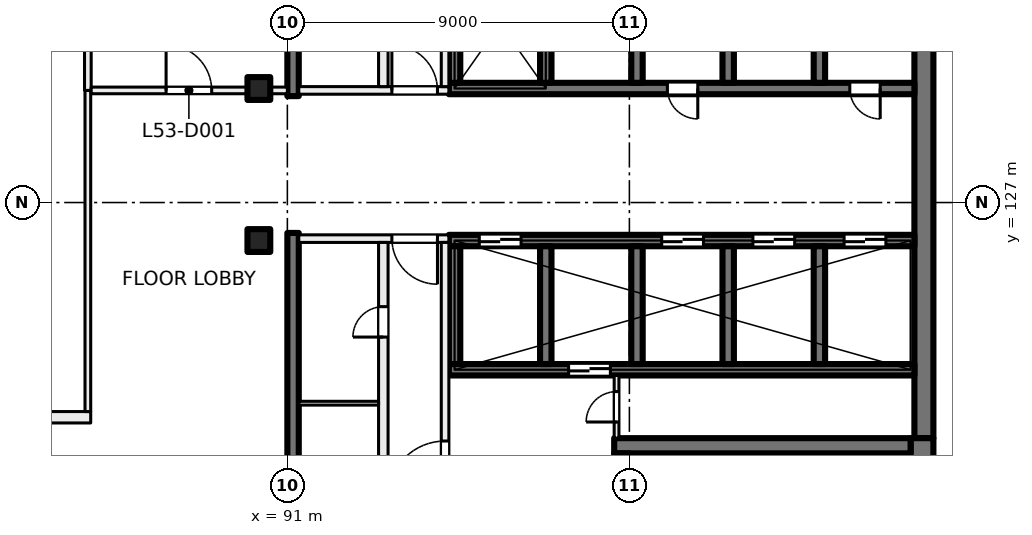
"""IFC4 building model, lengths in metres.
Left out: names, types, materials, properties, quantities, classifications, styles, units other than length and angle.
Written with IfcOpenShell. Run it as: python <this file> out.ifc"""

import sys

from ifc_helpers import new_model, si_unit, direction, frame, frame_2d, origin, origin_2d, place, context, subcontext, project, spatial, rectangle, extrude, element, fill, save


model = new_model("IFC4")
c1 = context("Model", 3, precision=1e-05, world=origin(), true_north=direction((0.0, 1.0)))
c2 = subcontext(c1, "Body", "Model", "MODEL_VIEW")
j1 = project(units=[si_unit("LENGTHUNIT", "METRE"), si_unit("PLANEANGLEUNIT", "RADIAN")], contexts=[c1])
p1 = place(None, origin())
s1 = spatial("IfcSite", under=j1, at=p1, CompositionType="ELEMENT")
p2 = place(p1, origin())
s2 = spatial("IfcBuilding", under=s1, at=p2, CompositionType="ELEMENT")
p3 = place(p2, frame((0.0, 0.0, 224.0)))
s3 = spatial("IfcBuildingStorey", under=s2, at=p3, CompositionType="ELEMENT", Elevation=224.0)
for number, where, z_axis, x_axis in (
    (1, (90.25, 130.0, 0.0), (0.0, 0.0, 1.0), (1.0, 0.0, 0.0)),
    (2, (90.25, 126.0, 0.0), (0.0, 0.0, 1.0), (1.0, 0.0, 0.0)),
):
    element("IfcColumn", number, at=place(p3, frame(where, z_axis=z_axis, x_axis=x_axis)), inside=s3, PredefinedType="COLUMN", context=c2, shape_type="SweptSolid", body=[
        extrude(rectangle(XDim=0.6, YDim=0.6, at=origin_2d()), origin(), (0.0, 0.0, 1.0), 4.0),
    ])
p4 = place(p3, frame((107.75, 135.2, 0.0), z_axis=(0.0, 0.0, 1.0), x_axis=(0.0, -1.0, 0.0)))
e3 = element("IfcWall", 3, at=p4, inside=s3, PredefinedType="SHEAR", context=c2, shape_type="SweptSolid", body=[
    extrude(rectangle(XDim=14.4, YDim=0.5, at=frame_2d((7.2, 0.0))), origin(), (0.0, 0.0, 1.0), 4.0),
])
p5 = place(p3, frame((107.7, 120.8, 0.0), z_axis=(0.0, 0.0, 1.0), x_axis=(0.0, -1.0, 0.0)))
e4 = element("IfcWall", 4, at=p5, inside=s3, PredefinedType="SHEAR", context=c2, shape_type="SweptSolid", body=[
    extrude(rectangle(XDim=3.8, YDim=0.6, at=frame_2d((1.9, 0.0))), origin(), (0.0, 0.0, 1.0), 4.0),
])
p6 = place(p3, frame((107.4, 120.6, 0.0), z_axis=(0.0, 0.0, 1.0), x_axis=(-1.0, 0.0, 0.0)))
e5 = element("IfcWall", 5, at=p6, inside=s3, PredefinedType="SHEAR", context=c2, shape_type="SweptSolid", body=[
    extrude(rectangle(XDim=7.8, YDim=0.4, at=frame_2d((3.9, 0.0))), origin(), (0.0, 0.0, 1.0), 4.0),
])
p7 = place(p3, frame((99.8, 120.4, 0.0), z_axis=(0.0, 0.0, 1.0), x_axis=(0.0, -1.0, 0.0)))
e6 = element("IfcWall", 6, at=p7, inside=s3, PredefinedType="SHEAR", context=c2, shape_type="SweptSolid", body=[
    extrude(rectangle(XDim=2.8, YDim=0.4, at=frame_2d((1.4, 0.0))), origin(), (0.0, 0.0, 1.0), 4.0),
])
p8 = place(p7, frame((0.95, 0.0, 0.0)))
e7 = element("IfcOpeningElement", 7, at=p8, cuts=e6, PredefinedType="OPENING", context=c2, shape_type="SweptSolid", body=[
    extrude(rectangle(XDim=1.0, YDim=2.1, at=frame_2d((0.5, 1.05))), frame((0.0, 0.21, 0.0), z_axis=(0.0, -1.0, 0.0), x_axis=(1.0, 0.0, 0.0)), (0.0, 0.0, 1.0), 0.42),
])
p9 = place(p3, frame((107.5, 130.0, 0.0), z_axis=(0.0, 0.0, 1.0), x_axis=(-1.0, 0.0, 0.0)))
e8 = element("IfcWall", 8, at=p9, inside=s3, PredefinedType="SHEAR", context=c2, shape_type="SweptSolid", body=[
    extrude(rectangle(XDim=12.25, YDim=0.3, at=frame_2d((6.125, 0.0))), origin(), (0.0, 0.0, 1.0), 4.0),
])
p10 = place(p9, frame((0.9, 0.0, 0.0)))
e9 = element("IfcOpeningElement", 9, at=p10, cuts=e8, PredefinedType="OPENING", context=c2, shape_type="SweptSolid", body=[
    extrude(rectangle(XDim=0.8, YDim=2.1, at=frame_2d((0.4, 1.05))), frame((0.0, 0.16, 0.0), z_axis=(0.0, -1.0, 0.0), x_axis=(1.0, 0.0, 0.0)), (0.0, 0.0, 1.0), 0.32),
])
p11 = place(p9, frame((5.7, 0.0, 0.0)))
e10 = element("IfcOpeningElement", 10, at=p11, cuts=e8, PredefinedType="OPENING", context=c2, shape_type="SweptSolid", body=[
    extrude(rectangle(XDim=0.8, YDim=2.1, at=frame_2d((0.4, 1.05))), frame((0.0, 0.16, 0.0), z_axis=(0.0, -1.0, 0.0), x_axis=(1.0, 0.0, 0.0)), (0.0, 0.0, 1.0), 0.32),
])
for number, where, z_axis, x_axis in (
    (11, (105.0, 133.25, 0.0), (0.0, 0.0, 1.0), (0.0, -1.0, 0.0)),
    (12, (102.6, 133.25, 0.0), (0.0, 0.0, 1.0), (0.0, -1.0, 0.0)),
    (13, (100.2, 133.25, 0.0), (0.0, 0.0, 1.0), (0.0, -1.0, 0.0)),
    (14, (97.8, 133.25, 0.0), (0.0, 0.0, 1.0), (0.0, -1.0, 0.0)),
    (15, (95.4, 133.25, 0.0), (0.0, 0.0, 1.0), (0.0, -1.0, 0.0)),
):
    element("IfcWall", number, at=place(p3, frame(where, z_axis=z_axis, x_axis=x_axis)), inside=s3, PredefinedType="SHEAR", context=c2, shape_type="SweptSolid", body=[
        extrude(rectangle(XDim=3.1, YDim=0.3, at=frame_2d((1.55, 0.0))), origin(), (0.0, 0.0, 1.0), 4.0),
    ])
p12 = place(p3, frame((107.5, 126.0, 0.0), z_axis=(0.0, 0.0, 1.0), x_axis=(-1.0, 0.0, 0.0)))
e16 = element("IfcWall", 16, at=p12, inside=s3, PredefinedType="SHEAR", context=c2, shape_type="SweptSolid", body=[
    extrude(rectangle(XDim=12.25, YDim=0.3, at=frame_2d((6.125, 0.0))), origin(), (0.0, 0.0, 1.0), 4.0),
])
p13 = place(p12, frame((0.75, 0.0, 0.0)))
e17 = element("IfcOpeningElement", 17, at=p13, cuts=e16, PredefinedType="OPENING", context=c2, shape_type="SweptSolid", body=[
    extrude(rectangle(XDim=1.1, YDim=2.1, at=frame_2d((0.55, 1.05))), frame((0.0, 0.16, 0.0), z_axis=(0.0, -1.0, 0.0), x_axis=(1.0, 0.0, 0.0)), (0.0, 0.0, 1.0), 0.32),
])
p14 = place(p12, frame((3.15, 0.0, 0.0)))
e18 = element("IfcOpeningElement", 18, at=p14, cuts=e16, PredefinedType="OPENING", context=c2, shape_type="SweptSolid", body=[
    extrude(rectangle(XDim=1.1, YDim=2.1, at=frame_2d((0.55, 1.05))), frame((0.0, 0.16, 0.0), z_axis=(0.0, -1.0, 0.0), x_axis=(1.0, 0.0, 0.0)), (0.0, 0.0, 1.0), 0.32),
])
p15 = place(p12, frame((5.55, 0.0, 0.0)))
e19 = element("IfcOpeningElement", 19, at=p15, cuts=e16, PredefinedType="OPENING", context=c2, shape_type="SweptSolid", body=[
    extrude(rectangle(XDim=1.1, YDim=2.1, at=frame_2d((0.55, 1.05))), frame((0.0, 0.16, 0.0), z_axis=(0.0, -1.0, 0.0), x_axis=(1.0, 0.0, 0.0)), (0.0, 0.0, 1.0), 0.32),
])
p16 = place(p12, frame((10.35, 0.0, 0.0)))
e20 = element("IfcOpeningElement", 20, at=p16, cuts=e16, PredefinedType="OPENING", context=c2, shape_type="SweptSolid", body=[
    extrude(rectangle(XDim=1.1, YDim=2.1, at=frame_2d((0.55, 1.05))), frame((0.0, 0.16, 0.0), z_axis=(0.0, -1.0, 0.0), x_axis=(1.0, 0.0, 0.0)), (0.0, 0.0, 1.0), 0.32),
])
p17 = place(p3, frame((107.5, 122.6, 0.0), z_axis=(0.0, 0.0, 1.0), x_axis=(-1.0, 0.0, 0.0)))
e21 = element("IfcWall", 21, at=p17, inside=s3, PredefinedType="SHEAR", context=c2, shape_type="SweptSolid", body=[
    extrude(rectangle(XDim=12.25, YDim=0.3, at=frame_2d((6.125, 0.0))), origin(), (0.0, 0.0, 1.0), 4.0),
])
p18 = place(p17, frame((8.0, 0.0, 0.0)))
e22 = element("IfcOpeningElement", 22, at=p18, cuts=e21, PredefinedType="OPENING", context=c2, shape_type="SweptSolid", body=[
    extrude(rectangle(XDim=1.1, YDim=2.1, at=frame_2d((0.55, 1.05))), frame((0.0, 0.16, 0.0), z_axis=(0.0, -1.0, 0.0), x_axis=(1.0, 0.0, 0.0)), (0.0, 0.0, 1.0), 0.32),
])
for number, where, z_axis, x_axis in (
    (23, (105.0, 125.85, 0.0), (0.0, 0.0, 1.0), (0.0, -1.0, 0.0)),
    (24, (102.6, 125.85, 0.0), (0.0, 0.0, 1.0), (0.0, -1.0, 0.0)),
    (25, (100.2, 125.85, 0.0), (0.0, 0.0, 1.0), (0.0, -1.0, 0.0)),
    (26, (97.8, 125.85, 0.0), (0.0, 0.0, 1.0), (0.0, -1.0, 0.0)),
    (27, (95.4, 125.85, 0.0), (0.0, 0.0, 1.0), (0.0, -1.0, 0.0)),
):
    element("IfcWall", number, at=place(p3, frame(where, z_axis=z_axis, x_axis=x_axis)), inside=s3, PredefinedType="SHEAR", context=c2, shape_type="SweptSolid", body=[
        extrude(rectangle(XDim=3.1, YDim=0.3, at=frame_2d((1.55, 0.0))), origin(), (0.0, 0.0, 1.0), 4.0),
    ])
for number, where, z_axis, x_axis in (
    (28, (91.15, 138.5, 0.0), (0.0, 0.0, 1.0), (0.0, -1.0, 0.0)),
    (29, (91.15, 126.2, 0.0), (0.0, 0.0, 1.0), (0.0, -1.0, 0.0)),
):
    element("IfcWall", number, at=place(p3, frame(where, z_axis=z_axis, x_axis=x_axis)), inside=s3, PredefinedType="SHEAR", context=c2, shape_type="SweptSolid", body=[
        extrude(rectangle(XDim=8.7, YDim=0.3, at=frame_2d((4.35, 0.0))), origin(), (0.0, 0.0, 1.0), 4.0),
    ])
p19 = place(p3, frame((95.25, 126.05, 0.0), z_axis=(0.0, 0.0, 1.0), x_axis=(-1.0, 0.0, 0.0)))
e30 = element("IfcWall", 30, at=p19, inside=s3, PredefinedType="PARTITIONING", context=c2, shape_type="SweptSolid", body=[
    extrude(rectangle(XDim=3.95, YDim=0.2, at=frame_2d((1.975, 0.0))), origin(), (0.0, 0.0, 1.0), 3.625),
])
p20 = place(p19, frame((0.3, 0.0, 0.0)))
e31 = element("IfcOpeningElement", 31, at=p20, cuts=e30, PredefinedType="OPENING", context=c2, shape_type="SweptSolid", body=[
    extrude(rectangle(XDim=1.2, YDim=2.1, at=frame_2d((0.6, 1.05))), frame((0.0, 0.11, 0.0), z_axis=(0.0, -1.0, 0.0), x_axis=(1.0, 0.0, 0.0)), (0.0, 0.0, 1.0), 0.22),
])
p21 = place(p3, frame((95.15, 117.5, 0.0), z_axis=(0.0, 0.0, 1.0), x_axis=(0.0, 1.0, 0.0)))
e32 = element("IfcWall", 32, at=p21, inside=s3, PredefinedType="PARTITIONING", context=c2, shape_type="SweptSolid", body=[
    extrude(rectangle(XDim=8.45, YDim=0.2, at=frame_2d((4.225, 0.0))), origin(), (0.0, 0.0, 1.0), 3.625),
])
p22 = place(p21, frame((1.725, 0.0, 0.0)))
e33 = element("IfcOpeningElement", 33, at=p22, cuts=e32, PredefinedType="OPENING", context=c2, shape_type="SweptSolid", body=[
    extrude(rectangle(XDim=1.5, YDim=2.1, at=frame_2d((0.75, 1.05))), frame((0.0, 0.11, 0.0), z_axis=(0.0, -1.0, 0.0), x_axis=(1.0, 0.0, 0.0)), (0.0, 0.0, 1.0), 0.22),
])
p23 = place(p3, frame((93.525, 117.5, 0.0), z_axis=(0.0, 0.0, 1.0), x_axis=(0.0, 1.0, 0.0)))
e34 = element("IfcWall", 34, at=p23, inside=s3, PredefinedType="PARTITIONING", context=c2, shape_type="SweptSolid", body=[
    extrude(rectangle(XDim=8.45, YDim=0.25, at=frame_2d((4.225, 0.0))), origin(), (0.0, 0.0, 1.0), 3.625),
])
p24 = place(p23, frame((5.96, 0.0, 0.0)))
e35 = element("IfcOpeningElement", 35, at=p24, cuts=e34, PredefinedType="OPENING", context=c2, shape_type="SweptSolid", body=[
    extrude(rectangle(XDim=0.8, YDim=2.1, at=frame_2d((0.4, 1.05))), frame((0.0, 0.135, 0.0), z_axis=(0.0, -1.0, 0.0), x_axis=(1.0, 0.0, 0.0)), (0.0, 0.0, 1.0), 0.27),
])
p25 = place(p23, frame((1.685, 0.0, 0.0)))
e36 = element("IfcOpeningElement", 36, at=p25, cuts=e34, PredefinedType="OPENING", context=c2, shape_type="SweptSolid", body=[
    extrude(rectangle(XDim=0.8, YDim=2.1, at=frame_2d((0.4, 1.05))), frame((0.0, 0.135, 0.0), z_axis=(0.0, -1.0, 0.0), x_axis=(1.0, 0.0, 0.0)), (0.0, 0.0, 1.0), 0.27),
])
p26 = place(p3, frame((99.663, 120.8, 0.0), z_axis=(0.0, 0.0, 1.0), x_axis=(0.0, 1.0, 0.0)))
e37 = element("IfcWall", 37, at=p26, inside=s3, PredefinedType="PARTITIONING", context=c2, shape_type="SweptSolid", body=[
    extrude(rectangle(XDim=1.65, YDim=0.125, at=frame_2d((0.825, 0.0))), origin(), (0.0, 0.0, 1.0), 3.625),
])
p27 = place(p26, frame((0.425, 0.0, 0.0)))
e38 = element("IfcOpeningElement", 38, at=p27, cuts=e37, PredefinedType="OPENING", context=c2, shape_type="SweptSolid", body=[
    extrude(rectangle(XDim=0.8, YDim=2.1, at=frame_2d((0.4, 1.05))), frame((0.0, 0.073, 0.0), z_axis=(0.0, -1.0, 0.0), x_axis=(1.0, 0.0, 0.0)), (0.0, 0.0, 1.0), 0.145),
])
p28 = place(p3, frame((93.4, 121.72, 0.0), z_axis=(0.0, 0.0, 1.0), x_axis=(-1.0, 0.0, 0.0)))
e39 = element("IfcWall", 39, at=p28, inside=s3, PredefinedType="PARTITIONING", context=c2, shape_type="SweptSolid", body=[
    extrude(rectangle(XDim=2.1, YDim=0.1, at=frame_2d((1.05, 0.0))), origin(), (0.0, 0.0, 1.0), 3.625),
])
p29 = place(p3, frame((91.3, 129.95, 0.0), z_axis=(0.0, 0.0, 1.0), x_axis=(1.0, 0.0, 0.0)))
e40 = element("IfcWall", 40, at=p29, inside=s3, PredefinedType="PARTITIONING", context=c2, shape_type="SweptSolid", body=[
    extrude(rectangle(XDim=3.95, YDim=0.2, at=frame_2d((1.975, 0.0))), origin(), (0.0, 0.0, 1.0), 3.625),
])
p30 = place(p29, frame((2.45, 0.0, 0.0)))
e41 = element("IfcOpeningElement", 41, at=p30, cuts=e40, PredefinedType="OPENING", context=c2, shape_type="SweptSolid", body=[
    extrude(rectangle(XDim=1.2, YDim=2.1, at=frame_2d((0.6, 1.05))), frame((0.0, 0.11, 0.0), z_axis=(0.0, -1.0, 0.0), x_axis=(1.0, 0.0, 0.0)), (0.0, 0.0, 1.0), 0.22),
])
p31 = place(p3, frame((95.15, 130.05, 0.0), z_axis=(0.0, 0.0, 1.0), x_axis=(0.0, 1.0, 0.0)))
e42 = element("IfcWall", 42, at=p31, inside=s3, PredefinedType="PARTITIONING", context=c2, shape_type="SweptSolid", body=[
    extrude(rectangle(XDim=8.45, YDim=0.2, at=frame_2d((4.225, 0.0))), origin(), (0.0, 0.0, 1.0), 3.625),
])
p32 = place(p31, frame((5.225, 0.0, 0.0)))
e43 = element("IfcOpeningElement", 43, at=p32, cuts=e42, PredefinedType="OPENING", context=c2, shape_type="SweptSolid", body=[
    extrude(rectangle(XDim=1.5, YDim=2.1, at=frame_2d((0.75, 1.05))), frame((0.0, 0.11, 0.0), z_axis=(0.0, -1.0, 0.0), x_axis=(1.0, 0.0, 0.0)), (0.0, 0.0, 1.0), 0.22),
])
p33 = place(p3, frame((93.525, 130.05, 0.0), z_axis=(0.0, 0.0, 1.0), x_axis=(0.0, 1.0, 0.0)))
e44 = element("IfcWall", 44, at=p33, inside=s3, PredefinedType="PARTITIONING", context=c2, shape_type="SweptSolid", body=[
    extrude(rectangle(XDim=8.45, YDim=0.25, at=frame_2d((4.225, 0.0))), origin(), (0.0, 0.0, 1.0), 3.625),
])
p34 = place(p33, frame((1.59, 0.0, 0.0)))
e45 = element("IfcOpeningElement", 45, at=p34, cuts=e44, PredefinedType="OPENING", context=c2, shape_type="SweptSolid", body=[
    extrude(rectangle(XDim=1.0, YDim=2.1, at=frame_2d((0.5, 1.05))), frame((0.0, 0.135, 0.0), z_axis=(0.0, -1.0, 0.0), x_axis=(1.0, 0.0, 0.0)), (0.0, 0.0, 1.0), 0.27),
])
p35 = place(p33, frame((5.865, 0.0, 0.0)))
e46 = element("IfcOpeningElement", 46, at=p35, cuts=e44, PredefinedType="OPENING", context=c2, shape_type="SweptSolid", body=[
    extrude(rectangle(XDim=1.0, YDim=2.1, at=frame_2d((0.5, 1.05))), frame((0.0, 0.135, 0.0), z_axis=(0.0, -1.0, 0.0), x_axis=(1.0, 0.0, 0.0)), (0.0, 0.0, 1.0), 0.27),
])
p36 = place(p3, frame((50.506, 121.35, 0.0), z_axis=(0.0, 0.0, 1.0), x_axis=(1.0, 0.0, 0.0)))
e47 = element("IfcWall", 47, at=p36, inside=s3, PredefinedType="PARTITIONING", context=c2, shape_type="SweptSolid", body=[
    extrude(rectangle(XDim=35.319, YDim=0.3, at=frame_2d((17.659, 0.0))), origin(), (0.0, 0.0, 1.0), 3.625),
])
p37 = place(p36, frame((27.244, 0.0, 0.0)))
e48 = element("IfcOpeningElement", 48, at=p37, cuts=e47, PredefinedType="OPENING", context=c2, shape_type="SweptSolid", body=[
    extrude(rectangle(XDim=1.0, YDim=2.1, at=frame_2d((0.5, 1.05))), frame((0.0, 0.16, 0.0), z_axis=(0.0, -1.0, 0.0), x_axis=(1.0, 0.0, 0.0)), (0.0, 0.0, 1.0), 0.32),
])
p38 = place(p36, frame((23.394, 0.0, 0.0)))
e49 = element("IfcOpeningElement", 49, at=p38, cuts=e47, PredefinedType="OPENING", context=c2, shape_type="SweptSolid", body=[
    extrude(rectangle(XDim=1.2, YDim=2.1, at=frame_2d((0.6, 1.05))), frame((0.0, 0.16, 0.0), z_axis=(0.0, -1.0, 0.0), x_axis=(1.0, 0.0, 0.0)), (0.0, 0.0, 1.0), 0.32),
])
p39 = place(p36, frame((32.094, 0.0, 0.0)))
e50 = element("IfcOpeningElement", 50, at=p39, cuts=e47, PredefinedType="OPENING", context=c2, shape_type="SweptSolid", body=[
    extrude(rectangle(XDim=1.8, YDim=2.1, at=frame_2d((0.9, 1.05))), frame((0.0, 0.16, 0.0), z_axis=(0.0, -1.0, 0.0), x_axis=(1.0, 0.0, 0.0)), (0.0, 0.0, 1.0), 0.32),
])
p40 = place(p36, frame((16.744, 0.0, 0.0)))
e51 = element("IfcOpeningElement", 51, at=p40, cuts=e47, PredefinedType="OPENING", context=c2, shape_type="SweptSolid", body=[
    extrude(rectangle(XDim=1.0, YDim=2.1, at=frame_2d((0.5, 1.05))), frame((0.0, 0.16, 0.0), z_axis=(0.0, -1.0, 0.0), x_axis=(1.0, 0.0, 0.0)), (0.0, 0.0, 1.0), 0.32),
])
p41 = place(p36, frame((7.344, 0.0, 0.0)))
e52 = element("IfcOpeningElement", 52, at=p41, cuts=e47, PredefinedType="OPENING", context=c2, shape_type="SweptSolid", body=[
    extrude(rectangle(XDim=1.8, YDim=2.1, at=frame_2d((0.9, 1.05))), frame((0.0, 0.16, 0.0), z_axis=(0.0, -1.0, 0.0), x_axis=(1.0, 0.0, 0.0)), (0.0, 0.0, 1.0), 0.32),
])
p42 = place(p36, frame((1.047, 0.0, 0.0)))
e53 = element("IfcOpeningElement", 53, at=p42, cuts=e47, PredefinedType="OPENING", context=c2, shape_type="SweptSolid", body=[
    extrude(rectangle(XDim=1.8, YDim=2.1, at=frame_2d((0.9, 1.05))), frame((0.0, 0.16, 0.0), z_axis=(0.0, -1.0, 0.0), x_axis=(1.0, 0.0, 0.0)), (0.0, 0.0, 1.0), 0.32),
])
p43 = place(p3, frame((85.75, 121.5, 0.0), z_axis=(0.0, 0.0, 1.0), x_axis=(0.0, 1.0, 0.0)))
e54 = element("IfcWall", 54, at=p43, inside=s3, PredefinedType="PARTITIONING", context=c2, shape_type="SweptSolid", body=[
    extrude(rectangle(XDim=8.45, YDim=0.15, at=frame_2d((4.225, 0.0))), origin(), (0.0, 0.0, 1.0), 3.625),
])
p44 = place(p3, frame((85.75, 129.95, 0.0), z_axis=(0.0, 0.0, 1.0), x_axis=(0.0, 1.0, 0.0)))
e55 = element("IfcWall", 55, at=p44, inside=s3, PredefinedType="PARTITIONING", context=c2, shape_type="SweptSolid", body=[
    extrude(rectangle(XDim=8.45, YDim=0.175, at=frame_2d((4.225, 0.0))), origin(), (0.0, 0.0, 1.0), 3.625),
])
p45 = place(p3, frame((85.838, 129.95, 0.0), z_axis=(0.0, 0.0, 1.0), x_axis=(1.0, 0.0, 0.0)))
e56 = element("IfcWall", 56, at=p45, inside=s3, PredefinedType="PARTITIONING", context=c2, shape_type="SweptSolid", body=[
    extrude(rectangle(XDim=5.162, YDim=0.175, at=frame_2d((2.581, 0.0))), origin(), (0.0, 0.0, 1.0), 3.625),
])
p46 = place(p45, frame((1.971, 0.0, 0.0)))
e57 = element("IfcOpeningElement", 57, at=p46, cuts=e56, PredefinedType="OPENING", context=c2, shape_type="SweptSolid", body=[
    extrude(rectangle(XDim=1.2, YDim=2.1, at=frame_2d((0.6, 1.05))), frame((0.0, 0.097, 0.0), z_axis=(0.0, -1.0, 0.0), x_axis=(1.0, 0.0, 0.0)), (0.0, 0.0, 1.0), 0.195),
])
p47 = place(p13, origin())
e58 = element("IfcDoor", 58, at=p47, inside=s3, OperationType="DOUBLE_DOOR_SLIDING", PredefinedType="DOOR", context=c2, shape_type="SweptSolid", body=[
    extrude(rectangle(XDim=1.1, YDim=2.1, at=frame_2d((0.55, 1.05))), frame((0.0, 0.025, 0.0), z_axis=(0.0, -1.0, 0.0), x_axis=(1.0, 0.0, 0.0)), (0.0, 0.0, 1.0), 0.05),
])
fill(e17, e58)
p48 = place(p14, origin())
e59 = element("IfcDoor", 59, at=p48, inside=s3, OperationType="DOUBLE_DOOR_SLIDING", PredefinedType="DOOR", context=c2, shape_type="SweptSolid", body=[
    extrude(rectangle(XDim=1.1, YDim=2.1, at=frame_2d((0.55, 1.05))), frame((0.0, 0.025, 0.0), z_axis=(0.0, -1.0, 0.0), x_axis=(1.0, 0.0, 0.0)), (0.0, 0.0, 1.0), 0.05),
])
fill(e18, e59)
p49 = place(p15, origin())
e60 = element("IfcDoor", 60, at=p49, inside=s3, OperationType="DOUBLE_DOOR_SLIDING", PredefinedType="DOOR", context=c2, shape_type="SweptSolid", body=[
    extrude(rectangle(XDim=1.1, YDim=2.1, at=frame_2d((0.55, 1.05))), frame((0.0, 0.025, 0.0), z_axis=(0.0, -1.0, 0.0), x_axis=(1.0, 0.0, 0.0)), (0.0, 0.0, 1.0), 0.05),
])
fill(e19, e60)
p50 = place(p16, origin())
e61 = element("IfcDoor", 61, at=p50, inside=s3, OperationType="DOUBLE_DOOR_SLIDING", PredefinedType="DOOR", context=c2, shape_type="SweptSolid", body=[
    extrude(rectangle(XDim=1.1, YDim=2.1, at=frame_2d((0.55, 1.05))), frame((0.0, 0.025, 0.0), z_axis=(0.0, -1.0, 0.0), x_axis=(1.0, 0.0, 0.0)), (0.0, 0.0, 1.0), 0.05),
])
fill(e20, e61)
p51 = place(p10, origin())
e62 = element("IfcDoor", 62, at=p51, inside=s3, OperationType="SINGLE_SWING_LEFT", PredefinedType="DOOR", context=c2, shape_type="SweptSolid", body=[
    extrude(rectangle(XDim=0.8, YDim=2.1, at=frame_2d((0.4, 1.05))), frame((0.0, 0.025, 0.0), z_axis=(0.0, -1.0, 0.0), x_axis=(1.0, 0.0, 0.0)), (0.0, 0.0, 1.0), 0.05),
])
fill(e9, e62)
p52 = place(p11, origin())
e63 = element("IfcDoor", 63, at=p52, inside=s3, OperationType="SINGLE_SWING_RIGHT", PredefinedType="DOOR", context=c2, shape_type="SweptSolid", body=[
    extrude(rectangle(XDim=0.8, YDim=2.1, at=frame_2d((0.4, 1.05))), frame((0.0, 0.025, 0.0), z_axis=(0.0, -1.0, 0.0), x_axis=(1.0, 0.0, 0.0)), (0.0, 0.0, 1.0), 0.05),
])
fill(e10, e63)
p53 = place(p20, origin())
e64 = element("IfcDoor", 64, at=p53, inside=s3, OperationType="DOUBLE_DOOR_SINGLE_SWING", PredefinedType="DOOR", context=c2, shape_type="SweptSolid", body=[
    extrude(rectangle(XDim=1.2, YDim=2.1, at=frame_2d((0.6, 1.05))), frame((0.0, 0.025, 0.0), z_axis=(0.0, -1.0, 0.0), x_axis=(1.0, 0.0, 0.0)), (0.0, 0.0, 1.0), 0.05),
])
fill(e31, e64)
p54 = place(p22, origin())
e65 = element("IfcDoor", 65, at=p54, inside=s3, OperationType="DOUBLE_DOOR_SINGLE_SWING", PredefinedType="DOOR", context=c2, shape_type="SweptSolid", body=[
    extrude(rectangle(XDim=1.5, YDim=2.1, at=frame_2d((0.75, 1.05))), frame((0.0, 0.025, 0.0), z_axis=(0.0, -1.0, 0.0), x_axis=(1.0, 0.0, 0.0)), (0.0, 0.0, 1.0), 0.05),
])
fill(e33, e65)
p55 = place(p27, origin())
e66 = element("IfcDoor", 66, at=p55, inside=s3, OperationType="SINGLE_SWING_RIGHT", PredefinedType="DOOR", context=c2, shape_type="SweptSolid", body=[
    extrude(rectangle(XDim=0.8, YDim=2.1, at=frame_2d((0.4, 1.05))), frame((0.0, 0.025, 0.0), z_axis=(0.0, -1.0, 0.0), x_axis=(1.0, 0.0, 0.0)), (0.0, 0.0, 1.0), 0.05),
])
fill(e38, e66)
p56 = place(p24, origin())
e67 = element("IfcDoor", 67, at=p56, inside=s3, OperationType="SINGLE_SWING_LEFT", PredefinedType="DOOR", context=c2, shape_type="SweptSolid", body=[
    extrude(rectangle(XDim=0.8, YDim=2.1, at=frame_2d((0.4, 1.05))), frame((0.0, 0.025, 0.0), z_axis=(0.0, -1.0, 0.0), x_axis=(1.0, 0.0, 0.0)), (0.0, 0.0, 1.0), 0.05),
])
fill(e35, e67)
p57 = place(p30, origin())
e68 = element("IfcDoor", 68, at=p57, inside=s3, OperationType="DOUBLE_DOOR_SINGLE_SWING", PredefinedType="DOOR", context=c2, shape_type="SweptSolid", body=[
    extrude(rectangle(XDim=1.2, YDim=2.1, at=frame_2d((0.6, 1.05))), frame((0.0, 0.025, 0.0), z_axis=(0.0, -1.0, 0.0), x_axis=(1.0, 0.0, 0.0)), (0.0, 0.0, 1.0), 0.05),
])
fill(e41, e68)
p58 = place(p18, origin())
e69 = element("IfcDoor", 69, at=p58, inside=s3, OperationType="DOUBLE_DOOR_SLIDING", PredefinedType="DOOR", context=c2, shape_type="SweptSolid", body=[
    extrude(rectangle(XDim=1.1, YDim=2.1, at=frame_2d((0.55, 1.05))), frame((0.0, 0.025, 0.0), z_axis=(0.0, -1.0, 0.0), x_axis=(1.0, 0.0, 0.0)), (0.0, 0.0, 1.0), 0.05),
])
fill(e22, e69)
p59 = place(p46, origin())
e70 = element("IfcDoor", 70, at=p59, inside=s3, OperationType="DOUBLE_DOOR_SINGLE_SWING", PredefinedType="DOOR", context=c2, shape_type="SweptSolid", body=[
    extrude(rectangle(XDim=1.2, YDim=2.1, at=frame_2d((0.6, 1.05))), frame((0.0, 0.025, 0.0), z_axis=(0.0, -1.0, 0.0), x_axis=(1.0, 0.0, 0.0)), (0.0, 0.0, 1.0), 0.05),
])
fill(e57, e70)
save(model, sys.argv[1])
